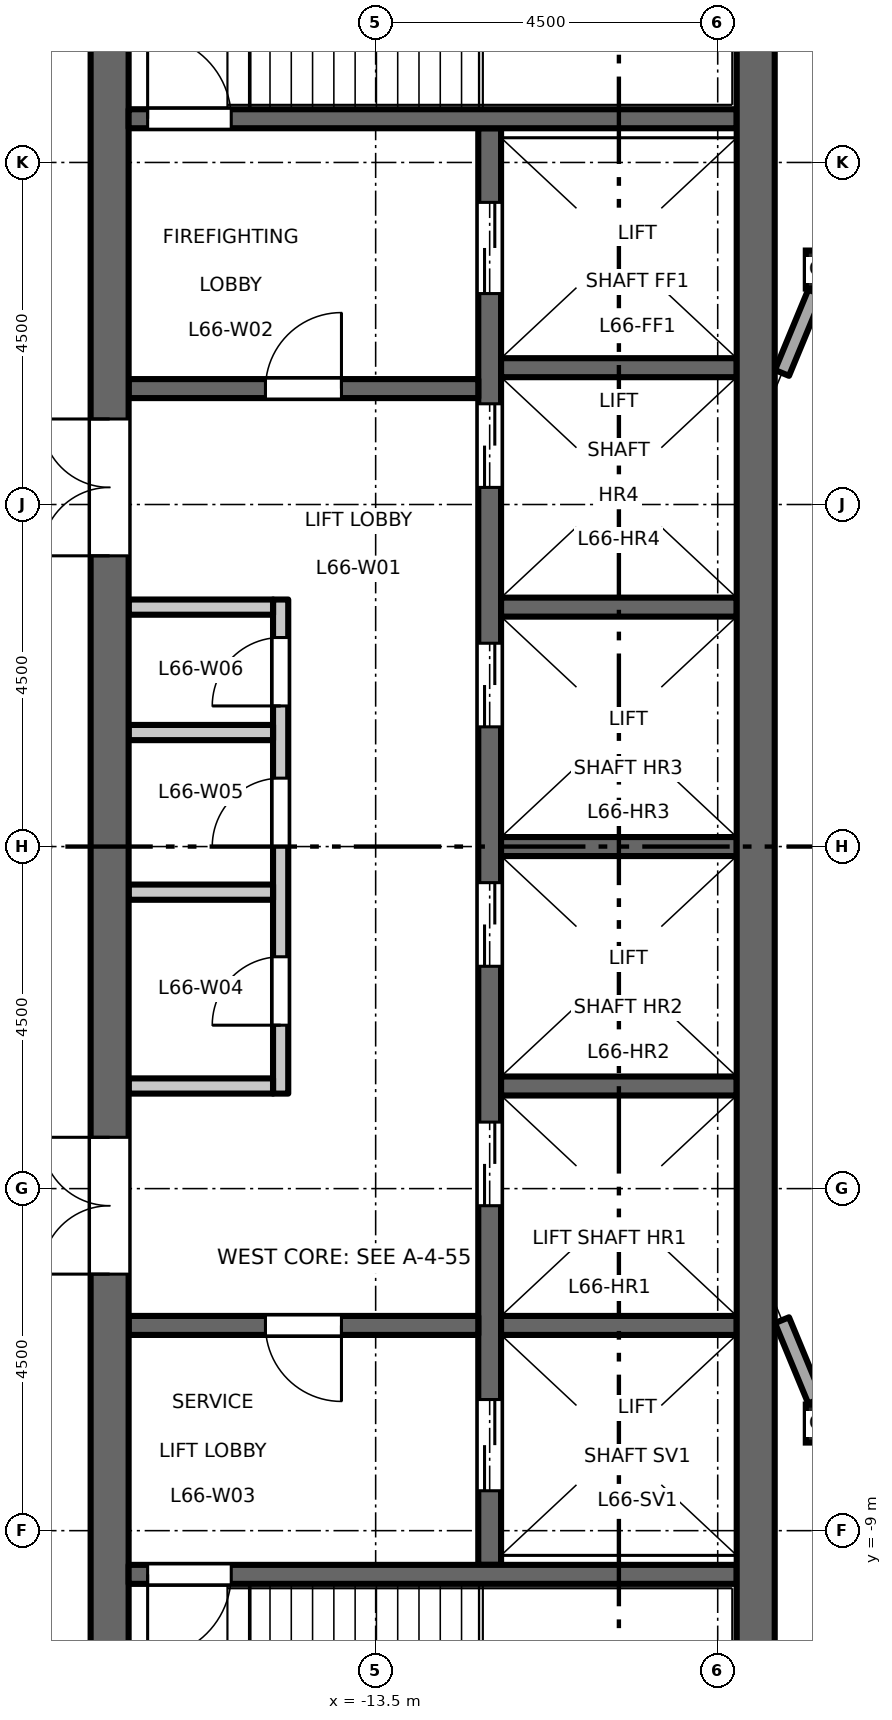
"""IFC4 building model, lengths in metres.
Left out: names, types, materials, properties, quantities, classifications, styles, units other than length and angle.
Written with IfcOpenShell. Run it as: python <this file> out.ifc"""

import sys

from ifc_helpers import new_model, si_unit, direction, frame, frame_2d, origin, origin_2d, place, context, subcontext, project, spatial, rectangle, hollow_rectangle, extrude, element, fill, save


model = new_model("IFC4")
c1 = context("Model", 3, precision=1e-05, world=origin(), true_north=direction((0.0, 1.0)))
c2 = subcontext(c1, "Body", "Model", "MODEL_VIEW")
j1 = project(units=[si_unit("LENGTHUNIT", "METRE"), si_unit("PLANEANGLEUNIT", "RADIAN")], contexts=[c1])
p1 = place(None, origin())
s1 = spatial("IfcSite", under=j1, at=p1, CompositionType="ELEMENT")
p2 = place(p1, origin())
s2 = spatial("IfcBuilding", under=s1, at=p2, CompositionType="ELEMENT")
p3 = place(p2, frame((0.0, 0.0, 307.7)))
s3 = spatial("IfcBuildingStorey", under=s2, at=p3, CompositionType="ELEMENT", Elevation=307.7)
for number, where, z_axis, x_axis in (
    (1, (-7.591, -7.591, 0.0), (0.0, 0.0, 1.0), (1.0, 0.0, 0.0)),
    (2, (-7.591, 7.591, 0.0), (0.0, 0.0, 1.0), (1.0, 0.0, 0.0)),
):
    element("IfcColumn", number, at=place(p3, frame(where, z_axis=z_axis, x_axis=x_axis)), inside=s3, PredefinedType="COLUMN", context=c2, shape_type="SweptSolid", body=[
        extrude(hollow_rectangle(XDim=0.5, YDim=0.5, WallThickness=0.025, at=origin_2d()), origin(), (0.0, 0.0, 1.0), 4.5),
    ])
p4 = place(p3, frame((-14.75, -3.25, 0.0), z_axis=(0.0, 0.0, 1.0), x_axis=(0.0, 1.0, 0.0)))
e3 = element("IfcWall", 3, at=p4, inside=s3, PredefinedType="PARTITIONING", context=c2, shape_type="SweptSolid", body=[
    extrude(rectangle(XDim=6.5, YDim=0.2, at=frame_2d((3.25, 0.0))), origin(), (0.0, 0.0, 1.0), 4.35),
])
p5 = place(p4, frame((0.9, 0.0, 0.0)))
e4 = element("IfcOpeningElement", 4, at=p5, cuts=e3, PredefinedType="OPENING", context=c2, shape_type="SweptSolid", body=[
    extrude(rectangle(XDim=0.9, YDim=2.1, at=frame_2d((0.45, 1.05))), frame((0.0, 0.11, 0.0), z_axis=(0.0, -1.0, 0.0), x_axis=(1.0, 0.0, 0.0)), (0.0, 0.0, 1.0), 0.22),
])
p6 = place(p4, frame((3.25, 0.0, 0.0)))
e5 = element("IfcOpeningElement", 5, at=p6, cuts=e3, PredefinedType="OPENING", context=c2, shape_type="SweptSolid", body=[
    extrude(rectangle(XDim=0.9, YDim=2.1, at=frame_2d((0.45, 1.05))), frame((0.0, 0.11, 0.0), z_axis=(0.0, -1.0, 0.0), x_axis=(1.0, 0.0, 0.0)), (0.0, 0.0, 1.0), 0.22),
])
p7 = place(p4, frame((5.1, 0.0, 0.0)))
e6 = element("IfcOpeningElement", 6, at=p7, cuts=e3, PredefinedType="OPENING", context=c2, shape_type="SweptSolid", body=[
    extrude(rectangle(XDim=0.9, YDim=2.1, at=frame_2d((0.45, 1.05))), frame((0.0, 0.11, 0.0), z_axis=(0.0, -1.0, 0.0), x_axis=(1.0, 0.0, 0.0)), (0.0, 0.0, 1.0), 0.22),
])
for number, where, z_axis, x_axis in (
    (7, (-14.85, 3.15, 0.0), (0.0, 0.0, 1.0), (-1.0, 0.0, 0.0)),
    (8, (-14.85, -3.15, 0.0), (0.0, 0.0, 1.0), (-1.0, 0.0, 0.0)),
    (9, (-14.85, -0.6, 0.0), (0.0, 0.0, 1.0), (-1.0, 0.0, 0.0)),
    (10, (-14.85, 1.5, 0.0), (0.0, 0.0, 1.0), (-1.0, 0.0, 0.0)),
):
    element("IfcWall", number, at=place(p3, frame(where, z_axis=z_axis, x_axis=x_axis)), inside=s3, PredefinedType="PARTITIONING", context=c2, shape_type="SweptSolid", body=[
        extrude(rectangle(XDim=1.9, YDim=0.2, at=frame_2d((0.95, 0.0))), origin(), (0.0, 0.0, 1.0), 4.35),
    ])
p8 = place(p3, frame((-12.0, -9.45, 0.0), z_axis=(0.0, 0.0, 1.0), x_axis=(0.0, 1.0, 0.0)))
e11 = element("IfcWall", 11, at=p8, inside=s3, PredefinedType="SHEAR", context=c2, shape_type="SweptSolid", body=[
    extrude(rectangle(XDim=18.9, YDim=0.3, at=frame_2d((9.45, 0.0))), origin(), (0.0, 0.0, 1.0), 4.35),
])
p9 = place(p8, frame((4.725, 0.0, 0.0)))
e12 = element("IfcOpeningElement", 12, at=p9, cuts=e11, PredefinedType="OPENING", context=c2, shape_type="SweptSolid", body=[
    extrude(rectangle(XDim=1.1, YDim=2.1, at=frame_2d((0.55, 1.05))), frame((0.0, 0.16, 0.0), z_axis=(0.0, -1.0, 0.0), x_axis=(1.0, 0.0, 0.0)), (0.0, 0.0, 1.0), 0.32),
])
p10 = place(p8, frame((7.875, 0.0, 0.0)))
e13 = element("IfcOpeningElement", 13, at=p10, cuts=e11, PredefinedType="OPENING", context=c2, shape_type="SweptSolid", body=[
    extrude(rectangle(XDim=1.1, YDim=2.1, at=frame_2d((0.55, 1.05))), frame((0.0, 0.16, 0.0), z_axis=(0.0, -1.0, 0.0), x_axis=(1.0, 0.0, 0.0)), (0.0, 0.0, 1.0), 0.32),
])
p11 = place(p8, frame((11.025, 0.0, 0.0)))
e14 = element("IfcOpeningElement", 14, at=p11, cuts=e11, PredefinedType="OPENING", context=c2, shape_type="SweptSolid", body=[
    extrude(rectangle(XDim=1.1, YDim=2.1, at=frame_2d((0.55, 1.05))), frame((0.0, 0.16, 0.0), z_axis=(0.0, -1.0, 0.0), x_axis=(1.0, 0.0, 0.0)), (0.0, 0.0, 1.0), 0.32),
])
p12 = place(p8, frame((14.175, 0.0, 0.0)))
e15 = element("IfcOpeningElement", 15, at=p12, cuts=e11, PredefinedType="OPENING", context=c2, shape_type="SweptSolid", body=[
    extrude(rectangle(XDim=1.1, YDim=2.1, at=frame_2d((0.55, 1.05))), frame((0.0, 0.16, 0.0), z_axis=(0.0, -1.0, 0.0), x_axis=(1.0, 0.0, 0.0)), (0.0, 0.0, 1.0), 0.32),
])
p13 = place(p8, frame((16.725, 0.0, 0.0)))
e16 = element("IfcOpeningElement", 16, at=p13, cuts=e11, PredefinedType="OPENING", context=c2, shape_type="SweptSolid", body=[
    extrude(rectangle(XDim=1.2, YDim=2.1, at=frame_2d((0.6, 1.05))), frame((0.0, 0.16, 0.0), z_axis=(0.0, -1.0, 0.0), x_axis=(1.0, 0.0, 0.0)), (0.0, 0.0, 1.0), 0.32),
])
p14 = place(p8, frame((0.975, 0.0, 0.0)))
e17 = element("IfcOpeningElement", 17, at=p14, cuts=e11, PredefinedType="OPENING", context=c2, shape_type="SweptSolid", body=[
    extrude(rectangle(XDim=1.2, YDim=2.1, at=frame_2d((0.6, 1.05))), frame((0.0, 0.16, 0.0), z_axis=(0.0, -1.0, 0.0), x_axis=(1.0, 0.0, 0.0)), (0.0, 0.0, 1.0), 0.32),
])
p15 = place(p3, frame((-12.15, 6.025, 0.0), z_axis=(0.0, 0.0, 1.0), x_axis=(-1.0, 0.0, 0.0)))
e18 = element("IfcWall", 18, at=p15, inside=s3, PredefinedType="SHEAR", context=c2, shape_type="SweptSolid", body=[
    extrude(rectangle(XDim=4.6, YDim=0.25, at=frame_2d((2.3, 0.0))), origin(), (0.0, 0.0, 1.0), 4.35),
])
p16 = place(p15, frame((1.8, 0.0, 0.0)))
e19 = element("IfcOpeningElement", 19, at=p16, cuts=e18, PredefinedType="OPENING", context=c2, shape_type="SweptSolid", body=[
    extrude(rectangle(XDim=1.0, YDim=2.1, at=frame_2d((0.5, 1.05))), frame((0.0, 0.135, 0.0), z_axis=(0.0, -1.0, 0.0), x_axis=(1.0, 0.0, 0.0)), (0.0, 0.0, 1.0), 0.27),
])
p17 = place(p3, frame((-12.15, -6.3, 0.0), z_axis=(0.0, 0.0, 1.0), x_axis=(-1.0, 0.0, 0.0)))
e20 = element("IfcWall", 20, at=p17, inside=s3, PredefinedType="SHEAR", context=c2, shape_type="SweptSolid", body=[
    extrude(rectangle(XDim=4.6, YDim=0.25, at=frame_2d((2.3, 0.0))), origin(), (0.0, 0.0, 1.0), 4.35),
])
p18 = place(p17, frame((1.8, 0.0, 0.0)))
e21 = element("IfcOpeningElement", 21, at=p18, cuts=e20, PredefinedType="OPENING", context=c2, shape_type="SweptSolid", body=[
    extrude(rectangle(XDim=1.0, YDim=2.1, at=frame_2d((0.5, 1.05))), frame((0.0, 0.135, 0.0), z_axis=(0.0, -1.0, 0.0), x_axis=(1.0, 0.0, 0.0)), (0.0, 0.0, 1.0), 0.27),
])
p19 = place(p3, frame((-17.0, -13.0, 0.0), z_axis=(0.0, 0.0, 1.0), x_axis=(0.0, 1.0, 0.0)))
e22 = element("IfcWall", 22, at=p19, inside=s3, PredefinedType="SHEAR", context=c2, shape_type="SweptSolid", body=[
    extrude(rectangle(XDim=26.0, YDim=0.5, at=frame_2d((13.0, 0.0))), origin(), (0.0, 0.0, 1.0), 4.35),
])
p20 = place(p19, frame((16.825, 0.0, 0.0)))
e23 = element("IfcOpeningElement", 23, at=p20, cuts=e22, PredefinedType="OPENING", context=c2, shape_type="SweptSolid", body=[
    extrude(rectangle(XDim=1.8, YDim=2.1, at=frame_2d((0.9, 1.05))), frame((0.0, 0.26, 0.0), z_axis=(0.0, -1.0, 0.0), x_axis=(1.0, 0.0, 0.0)), (0.0, 0.0, 1.0), 0.52),
])
p21 = place(p19, frame((7.375, 0.0, 0.0)))
e24 = element("IfcOpeningElement", 24, at=p21, cuts=e22, PredefinedType="OPENING", context=c2, shape_type="SweptSolid", body=[
    extrude(rectangle(XDim=1.8, YDim=2.1, at=frame_2d((0.9, 1.05))), frame((0.0, 0.26, 0.0), z_axis=(0.0, -1.0, 0.0), x_axis=(1.0, 0.0, 0.0)), (0.0, 0.0, 1.0), 0.52),
])
for number, where, z_axis, x_axis in (
    (25, (-8.75, 0.0, 0.0), (0.0, 0.0, 1.0), (-1.0, 0.0, 0.0)),
    (26, (-8.75, 3.15, 0.0), (0.0, 0.0, 1.0), (-1.0, 0.0, 0.0)),
    (27, (-8.75, 6.3, 0.0), (0.0, 0.0, 1.0), (-1.0, 0.0, 0.0)),
    (28, (-8.75, -3.15, 0.0), (0.0, 0.0, 1.0), (-1.0, 0.0, 0.0)),
    (29, (-8.75, -6.3, 0.0), (0.0, 0.0, 1.0), (-1.0, 0.0, 0.0)),
):
    element("IfcWall", number, at=place(p3, frame(where, z_axis=z_axis, x_axis=x_axis)), inside=s3, PredefinedType="SHEAR", context=c2, shape_type="SweptSolid", body=[
        extrude(rectangle(XDim=3.1, YDim=0.25, at=frame_2d((1.55, 0.0))), origin(), (0.0, 0.0, 1.0), 4.35),
    ])
p22 = place(p3, frame((-8.75, 9.575, 0.0), z_axis=(0.0, 0.0, 1.0), x_axis=(-1.0, 0.0, 0.0)))
e30 = element("IfcWall", 30, at=p22, inside=s3, PredefinedType="SHEAR", context=c2, shape_type="SweptSolid", body=[
    extrude(rectangle(XDim=8.0, YDim=0.25, at=frame_2d((4.0, 0.0))), origin(), (0.0, 0.0, 1.0), 4.35),
])
p23 = place(p22, frame((6.65, 0.0, 0.0)))
e31 = element("IfcOpeningElement", 31, at=p23, cuts=e30, PredefinedType="OPENING", context=c2, shape_type="SweptSolid", body=[
    extrude(rectangle(XDim=1.1, YDim=2.1, at=frame_2d((0.55, 1.05))), frame((0.0, 0.135, 0.0), z_axis=(0.0, -1.0, 0.0), x_axis=(1.0, 0.0, 0.0)), (0.0, 0.0, 1.0), 0.27),
])
p24 = place(p3, frame((-8.75, -9.575, 0.0), z_axis=(0.0, 0.0, 1.0), x_axis=(-1.0, 0.0, 0.0)))
e32 = element("IfcWall", 32, at=p24, inside=s3, PredefinedType="SHEAR", context=c2, shape_type="SweptSolid", body=[
    extrude(rectangle(XDim=8.0, YDim=0.25, at=frame_2d((4.0, 0.0))), origin(), (0.0, 0.0, 1.0), 4.35),
])
p25 = place(p24, frame((6.65, 0.0, 0.0)))
e33 = element("IfcOpeningElement", 33, at=p25, cuts=e32, PredefinedType="OPENING", context=c2, shape_type="SweptSolid", body=[
    extrude(rectangle(XDim=1.1, YDim=2.1, at=frame_2d((0.55, 1.05))), frame((0.0, 0.135, 0.0), z_axis=(0.0, -1.0, 0.0), x_axis=(1.0, 0.0, 0.0)), (0.0, 0.0, 1.0), 0.27),
])
p26 = place(p3, frame((-8.5, -13.0, 0.0), z_axis=(0.0, 0.0, 1.0), x_axis=(0.0, 1.0, 0.0)))
e34 = element("IfcWall", 34, at=p26, inside=s3, PredefinedType="SHEAR", context=c2, shape_type="SweptSolid", body=[
    extrude(rectangle(XDim=26.0, YDim=0.5, at=frame_2d((13.0, 0.0))), origin(), (0.0, 0.0, 1.0), 4.35),
])
for number, where, z_axis, x_axis in (
    (35, (-7.716, 7.289, 0.0), (0.0, 0.0, 1.0), (-0.383, -0.924, 0.0)),
    (36, (-8.154, -6.231, 0.0), (0.0, 0.0, 1.0), (0.383, -0.924, 0.0)),
):
    element("IfcWall", number, at=place(p3, frame(where, z_axis=z_axis, x_axis=x_axis)), inside=s3, PredefinedType="STANDARD", context=c2, shape_type="SweptSolid", body=[
        extrude(rectangle(XDim=1.146, YDim=0.2, at=frame_2d((0.573, 0.0))), origin(), (0.0, 0.0, 1.0), 4.01),
    ])
p27 = place(p16, origin())
e37 = element("IfcDoor", 37, at=p27, inside=s3, OperationType="SINGLE_SWING_LEFT", PredefinedType="DOOR", context=c2, shape_type="SweptSolid", body=[
    extrude(rectangle(XDim=1.0, YDim=2.1, at=frame_2d((0.5, 1.05))), frame((0.0, 0.025, 0.0), z_axis=(0.0, -1.0, 0.0), x_axis=(1.0, 0.0, 0.0)), (0.0, 0.0, 1.0), 0.05),
])
fill(e19, e37)
p28 = place(p18, origin())
e38 = element("IfcDoor", 38, at=p28, inside=s3, OperationType="SINGLE_SWING_RIGHT", PredefinedType="DOOR", context=c2, shape_type="SweptSolid", body=[
    extrude(rectangle(XDim=1.0, YDim=2.1, at=frame_2d((0.5, 1.05))), frame((0.0, 0.025, 0.0), z_axis=(0.0, -1.0, 0.0), x_axis=(1.0, 0.0, 0.0)), (0.0, 0.0, 1.0), 0.05),
])
fill(e21, e38)
p29 = place(p23, origin())
e39 = element("IfcDoor", 39, at=p29, inside=s3, OperationType="SINGLE_SWING_RIGHT", PredefinedType="DOOR", context=c2, shape_type="SweptSolid", body=[
    extrude(rectangle(XDim=1.1, YDim=2.1, at=frame_2d((0.55, 1.05))), frame((0.0, 0.025, 0.0), z_axis=(0.0, -1.0, 0.0), x_axis=(1.0, 0.0, 0.0)), (0.0, 0.0, 1.0), 0.05),
])
fill(e31, e39)
p30 = place(p25, origin())
e40 = element("IfcDoor", 40, at=p30, inside=s3, OperationType="SINGLE_SWING_LEFT", PredefinedType="DOOR", context=c2, shape_type="SweptSolid", body=[
    extrude(rectangle(XDim=1.1, YDim=2.1, at=frame_2d((0.55, 1.05))), frame((0.0, 0.025, 0.0), z_axis=(0.0, -1.0, 0.0), x_axis=(1.0, 0.0, 0.0)), (0.0, 0.0, 1.0), 0.05),
])
fill(e33, e40)
p31 = place(p20, origin())
e41 = element("IfcDoor", 41, at=p31, inside=s3, OperationType="DOUBLE_DOOR_DOUBLE_SWING", PredefinedType="DOOR", context=c2, shape_type="SweptSolid", body=[
    extrude(rectangle(XDim=1.8, YDim=2.1, at=frame_2d((0.9, 1.05))), frame((0.0, 0.025, 0.0), z_axis=(0.0, -1.0, 0.0), x_axis=(1.0, 0.0, 0.0)), (0.0, 0.0, 1.0), 0.05),
])
fill(e23, e41)
p32 = place(p21, origin())
e42 = element("IfcDoor", 42, at=p32, inside=s3, OperationType="DOUBLE_DOOR_DOUBLE_SWING", PredefinedType="DOOR", context=c2, shape_type="SweptSolid", body=[
    extrude(rectangle(XDim=1.8, YDim=2.1, at=frame_2d((0.9, 1.05))), frame((0.0, 0.025, 0.0), z_axis=(0.0, -1.0, 0.0), x_axis=(1.0, 0.0, 0.0)), (0.0, 0.0, 1.0), 0.05),
])
fill(e24, e42)
p33 = place(p9, origin())
e43 = element("IfcDoor", 43, at=p33, inside=s3, OperationType="DOUBLE_DOOR_SLIDING", PredefinedType="DOOR", context=c2, shape_type="SweptSolid", body=[
    extrude(rectangle(XDim=1.1, YDim=2.1, at=frame_2d((0.55, 1.05))), frame((0.0, 0.025, 0.0), z_axis=(0.0, -1.0, 0.0), x_axis=(1.0, 0.0, 0.0)), (0.0, 0.0, 1.0), 0.05),
])
fill(e12, e43)
p34 = place(p10, origin())
e44 = element("IfcDoor", 44, at=p34, inside=s3, OperationType="DOUBLE_DOOR_SLIDING", PredefinedType="DOOR", context=c2, shape_type="SweptSolid", body=[
    extrude(rectangle(XDim=1.1, YDim=2.1, at=frame_2d((0.55, 1.05))), frame((0.0, 0.025, 0.0), z_axis=(0.0, -1.0, 0.0), x_axis=(1.0, 0.0, 0.0)), (0.0, 0.0, 1.0), 0.05),
])
fill(e13, e44)
p35 = place(p11, origin())
e45 = element("IfcDoor", 45, at=p35, inside=s3, OperationType="DOUBLE_DOOR_SLIDING", PredefinedType="DOOR", context=c2, shape_type="SweptSolid", body=[
    extrude(rectangle(XDim=1.1, YDim=2.1, at=frame_2d((0.55, 1.05))), frame((0.0, 0.025, 0.0), z_axis=(0.0, -1.0, 0.0), x_axis=(1.0, 0.0, 0.0)), (0.0, 0.0, 1.0), 0.05),
])
fill(e14, e45)
p36 = place(p12, origin())
e46 = element("IfcDoor", 46, at=p36, inside=s3, OperationType="DOUBLE_DOOR_SLIDING", PredefinedType="DOOR", context=c2, shape_type="SweptSolid", body=[
    extrude(rectangle(XDim=1.1, YDim=2.1, at=frame_2d((0.55, 1.05))), frame((0.0, 0.025, 0.0), z_axis=(0.0, -1.0, 0.0), x_axis=(1.0, 0.0, 0.0)), (0.0, 0.0, 1.0), 0.05),
])
fill(e15, e46)
p37 = place(p13, origin())
e47 = element("IfcDoor", 47, at=p37, inside=s3, OperationType="DOUBLE_DOOR_SLIDING", PredefinedType="DOOR", context=c2, shape_type="SweptSolid", body=[
    extrude(rectangle(XDim=1.2, YDim=2.1, at=frame_2d((0.6, 1.05))), frame((0.0, 0.025, 0.0), z_axis=(0.0, -1.0, 0.0), x_axis=(1.0, 0.0, 0.0)), (0.0, 0.0, 1.0), 0.05),
])
fill(e16, e47)
p38 = place(p14, origin())
e48 = element("IfcDoor", 48, at=p38, inside=s3, OperationType="DOUBLE_DOOR_SLIDING", PredefinedType="DOOR", context=c2, shape_type="SweptSolid", body=[
    extrude(rectangle(XDim=1.2, YDim=2.1, at=frame_2d((0.6, 1.05))), frame((0.0, 0.025, 0.0), z_axis=(0.0, -1.0, 0.0), x_axis=(1.0, 0.0, 0.0)), (0.0, 0.0, 1.0), 0.05),
])
fill(e17, e48)
p39 = place(p5, origin())
e49 = element("IfcDoor", 49, at=p39, inside=s3, OperationType="SINGLE_SWING_RIGHT", PredefinedType="DOOR", context=c2, shape_type="SweptSolid", body=[
    extrude(rectangle(XDim=0.9, YDim=2.1, at=frame_2d((0.45, 1.05))), frame((0.0, 0.025, 0.0), z_axis=(0.0, -1.0, 0.0), x_axis=(1.0, 0.0, 0.0)), (0.0, 0.0, 1.0), 0.05),
])
fill(e4, e49)
p40 = place(p6, origin())
e50 = element("IfcDoor", 50, at=p40, inside=s3, OperationType="SINGLE_SWING_RIGHT", PredefinedType="DOOR", context=c2, shape_type="SweptSolid", body=[
    extrude(rectangle(XDim=0.9, YDim=2.1, at=frame_2d((0.45, 1.05))), frame((0.0, 0.025, 0.0), z_axis=(0.0, -1.0, 0.0), x_axis=(1.0, 0.0, 0.0)), (0.0, 0.0, 1.0), 0.05),
])
fill(e5, e50)
p41 = place(p7, origin())
e51 = element("IfcDoor", 51, at=p41, inside=s3, OperationType="SINGLE_SWING_RIGHT", PredefinedType="DOOR", context=c2, shape_type="SweptSolid", body=[
    extrude(rectangle(XDim=0.9, YDim=2.1, at=frame_2d((0.45, 1.05))), frame((0.0, 0.025, 0.0), z_axis=(0.0, -1.0, 0.0), x_axis=(1.0, 0.0, 0.0)), (0.0, 0.0, 1.0), 0.05),
])
fill(e6, e51)
save(model, sys.argv[1])
